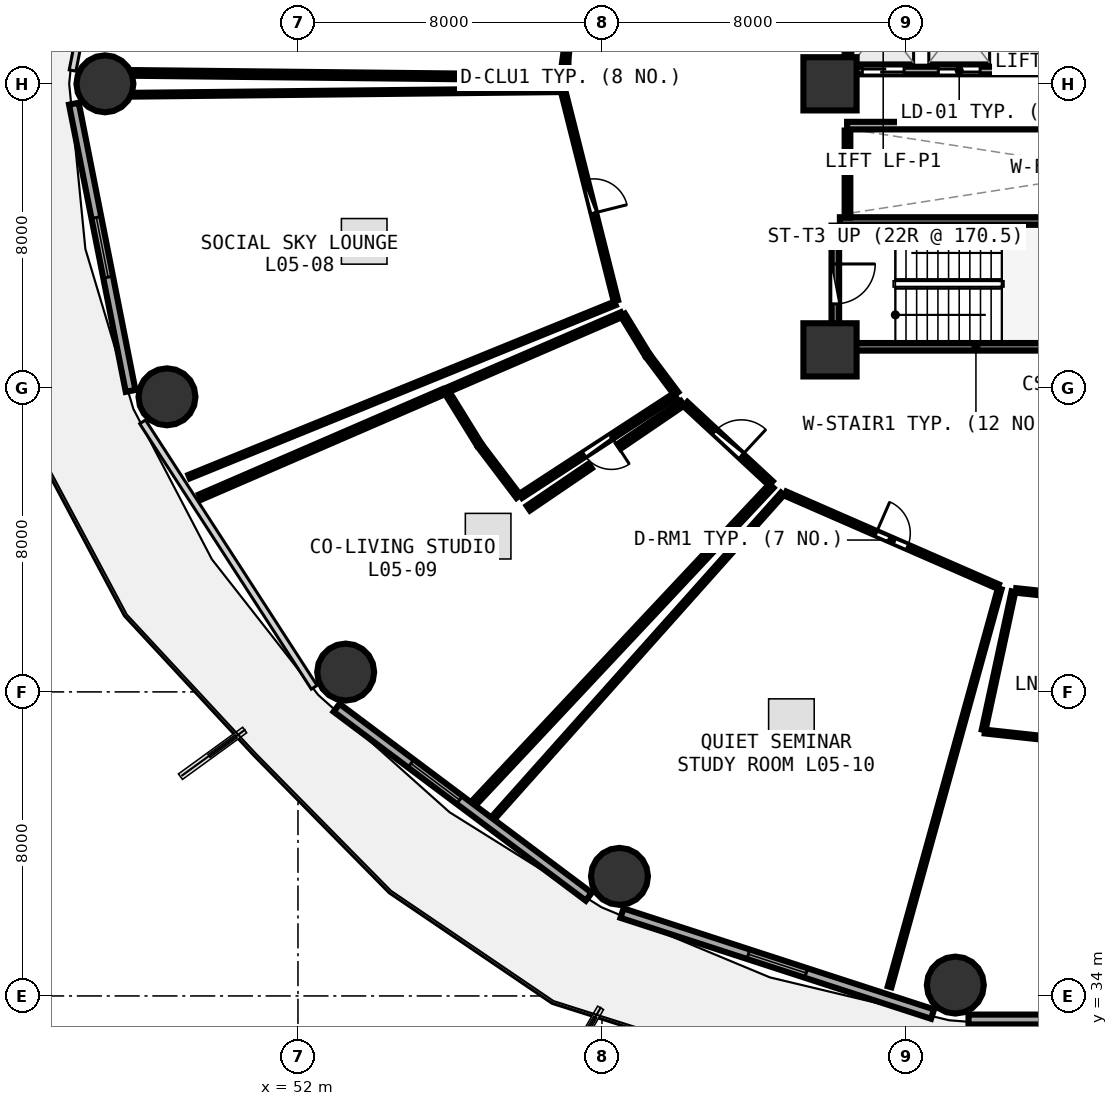
"""IFC4 building model, lengths in metres.
Left out: names, types, materials, properties, quantities, classifications, styles, units other than length and angle.
Written with IfcOpenShell. Run it as: python <this file> out.ifc"""

import sys

from ifc_helpers import new_model, si_unit, direction, frame, frame_2d, origin, origin_2d, place, context, subcontext, project, spatial, rectangle, circle, extrude, element, fill, save


model = new_model("IFC4")
c1 = context("Model", 3, precision=1e-05, world=origin(), true_north=direction((0.0, 1.0)))
c2 = subcontext(c1, "Body", "Model", "MODEL_VIEW")
j1 = project(units=[si_unit("LENGTHUNIT", "METRE"), si_unit("PLANEANGLEUNIT", "RADIAN")], contexts=[c1])
p1 = place(None, origin())
s1 = spatial("IfcSite", under=j1, at=p1, CompositionType="ELEMENT")
p2 = place(p1, origin())
s2 = spatial("IfcBuilding", under=s1, at=p2, CompositionType="ELEMENT")
p3 = place(p2, frame((0.0, 0.0, 22.5)))
s3 = spatial("IfcBuildingStorey", under=s2, at=p3, CompositionType="ELEMENT", Elevation=22.5)
for number, where, z_axis, x_axis in (
    (1, (66.0, 51.0, 0.0), (0.0, 0.0, 1.0), (1.0, 0.0, 0.0)),
    (2, (66.0, 58.0, 0.0), (0.0, 0.0, 1.0), (1.0, 0.0, 0.0)),
):
    element("IfcColumn", number, at=place(p3, frame(where, z_axis=z_axis, x_axis=x_axis)), inside=s3, PredefinedType="PILASTER", context=c2, shape_type="SweptSolid", body=[
        extrude(rectangle(XDim=1.4, YDim=1.4, at=origin_2d()), origin(), (0.0, 0.0, 1.0), 3.75),
    ])
for number, where, z_axis, x_axis in (
    (3, (46.92, 58.0, 0.0), (0.0, 0.0, 1.0), (1.0, 0.0, 0.0)),
    (4, (48.553, 49.764, 0.0), (0.0, 0.0, 1.0), (1.0, 0.0, 0.0)),
    (5, (53.256, 42.522, 0.0), (0.0, 0.0, 1.0), (1.0, 0.0, 0.0)),
    (6, (60.46, 37.146, 0.0), (0.0, 0.0, 1.0), (1.0, 0.0, 0.0)),
    (7, (69.298, 34.286, 0.0), (0.0, 0.0, 1.0), (1.0, 0.0, 0.0)),
):
    element("IfcColumn", number, at=place(p3, frame(where, z_axis=z_axis, x_axis=x_axis)), inside=s3, PredefinedType="COLUMN", context=c2, shape_type="SweptSolid", body=[
        extrude(circle(Radius=0.75, at=origin_2d()), origin(), (0.0, 0.0, 1.0), 3.75),
    ])
p4 = place(p3, frame((46.104, 57.477, 0.0), z_axis=(0.0, 0.0, 1.0), x_axis=(0.193726159581, -0.98105564322, 0.0)))
e8 = element("IfcWall", 8, at=p4, inside=s3, PredefinedType="SOLIDWALL", context=c2, shape_type="SweptSolid", body=[
    extrude(rectangle(XDim=7.703, YDim=0.26, at=frame_2d((3.851, 0.0))), origin(), (0.0, 0.0, 1.0), 3.475),
])
p5 = place(p4, frame((3.051, 0.0, 0.85)))
e9 = element("IfcOpeningElement", 9, at=p5, cuts=e8, PredefinedType="OPENING", context=c2, shape_type="SweptSolid", body=[
    extrude(rectangle(XDim=1.6, YDim=1.45, at=frame_2d((0.8, 0.725))), frame((0.0, 0.14, 0.0), z_axis=(0.0, -1.0, 0.0), x_axis=(1.0, 0.0, 0.0)), (0.0, 0.0, 1.0), 0.28),
])
p6 = place(p3, frame((53.016, 41.582, 0.0), z_axis=(0.0, 0.0, 1.0), x_axis=(0.80030733173, -0.599590005569, 0.0)))
e10 = element("IfcWall", 10, at=p6, inside=s3, PredefinedType="SOLIDWALL", context=c2, shape_type="SweptSolid", body=[
    extrude(rectangle(XDim=8.291, YDim=0.26, at=frame_2d((4.145, 0.0))), origin(), (0.0, 0.0, 1.0), 3.475),
])
p7 = place(p6, frame((2.445, 0.0, 0.85)))
e11 = element("IfcOpeningElement", 11, at=p7, cuts=e10, PredefinedType="OPENING", context=c2, shape_type="SweptSolid", body=[
    extrude(rectangle(XDim=1.6, YDim=1.45, at=frame_2d((0.8, 0.725))), frame((0.0, 0.14, 0.0), z_axis=(0.0, -1.0, 0.0), x_axis=(1.0, 0.0, 0.0)), (0.0, 0.0, 1.0), 0.28),
])
p8 = place(p3, frame((60.526, 36.178, 0.0), z_axis=(0.0, 0.0, 1.0), x_axis=(0.951039914291, -0.309068085421, 0.0)))
e12 = element("IfcWall", 12, at=p8, inside=s3, PredefinedType="SOLIDWALL", context=c2, shape_type="SweptSolid", body=[
    extrude(rectangle(XDim=8.594, YDim=0.26, at=frame_2d((4.297, 0.0))), origin(), (0.0, 0.0, 1.0), 3.475),
])
p9 = place(p8, frame((3.497, 0.0, 0.85)))
e13 = element("IfcOpeningElement", 13, at=p9, cuts=e12, PredefinedType="OPENING", context=c2, shape_type="SweptSolid", body=[
    extrude(rectangle(XDim=1.6, YDim=1.45, at=frame_2d((0.8, 0.725))), frame((0.0, 0.14, 0.0), z_axis=(0.0, -1.0, 0.0), x_axis=(1.0, 0.0, 0.0)), (0.0, 0.0, 1.0), 0.28),
])
p10 = place(p3, frame((69.644, 33.38, 0.0), z_axis=(0.0, 0.0, 1.0), x_axis=(1.0, 0.0, 0.0)))
e14 = element("IfcWall", 14, at=p10, inside=s3, PredefinedType="SOLIDWALL", context=c2, shape_type="SweptSolid", body=[
    extrude(rectangle(XDim=8.712, YDim=0.26, at=frame_2d((4.356, 0.0))), origin(), (0.0, 0.0, 1.0), 3.475),
])
p11 = place(p10, frame((4.456, 0.0, 0.85)))
e15 = element("IfcOpeningElement", 15, at=p11, cuts=e14, PredefinedType="OPENING", context=c2, shape_type="SweptSolid", body=[
    extrude(rectangle(XDim=1.6, YDim=1.45, at=frame_2d((0.8, 0.725))), frame((0.0, 0.14, 0.0), z_axis=(0.0, -1.0, 0.0), x_axis=(1.0, 0.0, 0.0)), (0.0, 0.0, 1.0), 0.28),
])
for number, where, z_axis, x_axis in (
    (16, (66.26, 51.08, 0.0), (0.0, 0.0, 1.0), (1.0, 0.0, 0.0)),
    (17, (73.42, 54.39, 0.0), (0.0, 0.0, 1.0), (-1.0, 0.0, 0.0)),
):
    element("IfcWall", number, at=place(p3, frame(where, z_axis=z_axis, x_axis=x_axis)), inside=s3, PredefinedType="SHEAR", context=c2, shape_type="SweptSolid", body=[
        extrude(rectangle(XDim=7.16, YDim=0.2, at=frame_2d((3.58, 0.0))), origin(), (0.0, 0.0, 1.0), 3.49),
    ])
p12 = place(p3, frame((66.14, 54.27, 0.0), z_axis=(0.0, 0.0, 1.0), x_axis=(0.0, -1.0, 0.0)))
e18 = element("IfcWall", 18, at=p12, inside=s3, PredefinedType="SHEAR", context=c2, shape_type="SweptSolid", body=[
    extrude(rectangle(XDim=3.07, YDim=0.2, at=frame_2d((1.535, 0.0))), origin(), (0.0, 0.0, 1.0), 3.49),
])
p13 = place(p12, frame((1.01, 0.0, 0.0)))
e19 = element("IfcOpeningElement", 19, at=p13, cuts=e18, PredefinedType="OPENING", context=c2, shape_type="SweptSolid", body=[
    extrude(rectangle(XDim=1.05, YDim=2.1, at=frame_2d((0.525, 1.05))), frame((0.0, 0.11, 0.0), z_axis=(0.0, -1.0, 0.0), x_axis=(1.0, 0.0, 0.0)), (0.0, 0.0, 1.0), 0.22),
])
p14 = place(p3, frame((66.45, 58.35, 0.0), z_axis=(0.0, 0.0, 1.0), x_axis=(1.0, 0.0, 0.0)))
e20 = element("IfcWall", 20, at=p14, inside=s3, PredefinedType="SOLIDWALL", context=c2, shape_type="SweptSolid", body=[
    extrude(rectangle(XDim=6.0, YDim=0.2, at=frame_2d((3.0, 0.0))), origin(), (0.0, 0.0, 1.0), 3.48),
])
p15 = place(p14, frame((0.4, 0.0, 0.0)))
e21 = element("IfcOpeningElement", 21, at=p15, cuts=e20, PredefinedType="OPENING", context=c2, shape_type="SweptSolid", body=[
    extrude(rectangle(XDim=1.1, YDim=2.1, at=frame_2d((0.55, 1.05))), frame((0.0, 0.11, 0.0), z_axis=(0.0, -1.0, 0.0), x_axis=(1.0, 0.0, 0.0)), (0.0, 0.0, 1.0), 0.22),
])
p16 = place(p14, frame((2.4, 0.0, 0.0)))
e22 = element("IfcOpeningElement", 22, at=p16, cuts=e20, PredefinedType="OPENING", context=c2, shape_type="SweptSolid", body=[
    extrude(rectangle(XDim=1.1, YDim=2.1, at=frame_2d((0.55, 1.05))), frame((0.0, 0.11, 0.0), z_axis=(0.0, -1.0, 0.0), x_axis=(1.0, 0.0, 0.0)), (0.0, 0.0, 1.0), 0.22),
])
p17 = place(p14, frame((4.4, 0.0, 0.0)))
e23 = element("IfcOpeningElement", 23, at=p17, cuts=e20, PredefinedType="OPENING", context=c2, shape_type="SweptSolid", body=[
    extrude(rectangle(XDim=1.1, YDim=2.1, at=frame_2d((0.55, 1.05))), frame((0.0, 0.11, 0.0), z_axis=(0.0, -1.0, 0.0), x_axis=(1.0, 0.0, 0.0)), (0.0, 0.0, 1.0), 0.22),
])
p18 = place(p3, frame((66.46, 58.48, 0.0), z_axis=(0.0, 0.0, 1.0), x_axis=(0.0, 1.0, 0.0)))
e24 = element("IfcWall", 24, at=p18, inside=s3, PredefinedType="PARTITIONING", context=c2, shape_type="SweptSolid", body=[
    extrude(rectangle(XDim=2.46, YDim=0.15, at=frame_2d((1.23, 0.0))), origin(), (0.0, 0.0, 1.0), 3.48),
])
p19 = place(p3, frame((66.45, 56.9, 0.0), z_axis=(0.0, 0.0, 1.0), x_axis=(1.0, 0.0, 0.0)))
e25 = element("IfcWall", 25, at=p19, inside=s3, PredefinedType="SOLIDWALL", context=c2, shape_type="SweptSolid", body=[
    extrude(rectangle(XDim=14.4, YDim=0.2, at=frame_2d((7.2, 0.0))), origin(), (0.0, 0.0, 1.0), 3.48),
])
p20 = place(p3, frame((66.46, 54.48, 0.0), z_axis=(0.0, 0.0, 1.0), x_axis=(0.0, 1.0, 0.0)))
e26 = element("IfcWall", 26, at=p20, inside=s3, PredefinedType="PARTITIONING", context=c2, shape_type="SweptSolid", body=[
    extrude(rectangle(XDim=2.29, YDim=0.15, at=frame_2d((1.145, 0.0))), origin(), (0.0, 0.0, 1.0), 3.48),
])
p21 = place(p3, frame((59.375, 61.115, 0.0), z_axis=(0.0, 0.0, 1.0), x_axis=(-0.135838186105, -0.990731036758, 0.0)))
e27 = element("IfcWall", 27, at=p21, inside=s3, PredefinedType="PARTITIONING", context=c2, shape_type="SweptSolid", body=[
    extrude(rectangle(XDim=2.915, YDim=0.15, at=frame_2d((1.458, 0.0))), origin(), (0.0, 0.0, 1.0), 3.48),
])
p22 = place(p21, frame((0.983, 0.0, 0.0)))
e28 = element("IfcOpeningElement", 28, at=p22, cuts=e27, PredefinedType="OPENING", context=c2, shape_type="SweptSolid", body=[
    extrude(rectangle(XDim=0.95, YDim=2.08, at=frame_2d((0.475, 1.04))), frame((0.0, 0.085, 0.0), z_axis=(0.0, -1.0, 0.0), x_axis=(1.0, 0.0, 0.0)), (0.0, 0.0, 1.0), 0.17),
])
p23 = place(p3, frame((58.986, 57.775, 0.0), z_axis=(0.0, 0.0, 1.0), x_axis=(0.244192294026, -0.969726829338, 0.0)))
e29 = element("IfcWall", 29, at=p23, inside=s3, PredefinedType="PARTITIONING", context=c2, shape_type="SweptSolid", body=[
    extrude(rectangle(XDim=5.651, YDim=0.12, at=frame_2d((2.825, 0.0))), origin(), (0.0, 0.0, 1.0), 3.48),
])
p24 = place(p23, frame((2.375, 0.0, 0.0)))
e30 = element("IfcOpeningElement", 30, at=p24, cuts=e29, PredefinedType="OPENING", context=c2, shape_type="SweptSolid", body=[
    extrude(rectangle(XDim=0.9, YDim=2.08, at=frame_2d((0.45, 1.04))), frame((0.0, 0.07, 0.0), z_axis=(0.0, -1.0, 0.0), x_axis=(1.0, 0.0, 0.0)), (0.0, 0.0, 1.0), 0.14),
])
p25 = place(p3, frame((61.917, 49.8, 0.0), z_axis=(0.0, 0.0, 1.0), x_axis=(-0.837796261941, -0.545982988267, 0.0)))
e31 = element("IfcWall", 31, at=p25, inside=s3, PredefinedType="PLUMBINGWALL", context=c2, shape_type="SweptSolid", body=[
    extrude(rectangle(XDim=4.838, YDim=0.13, at=frame_2d((2.419, 0.0))), origin(), (0.0, 0.0, 1.0), 3.235),
])
p26 = place(p25, frame((1.989, 0.0, 0.0)))
e32 = element("IfcOpeningElement", 32, at=p26, cuts=e31, PredefinedType="OPENING", context=c2, shape_type="SweptSolid", body=[
    extrude(rectangle(XDim=0.86, YDim=2.05, at=frame_2d((0.43, 1.025))), frame((0.0, 0.075, 0.0), z_axis=(0.0, -1.0, 0.0), x_axis=(1.0, 0.0, 0.0)), (0.0, 0.0, 1.0), 0.15),
])
p27 = place(p3, frame((62.194, 49.575, 0.0), z_axis=(0.0, 0.0, 1.0), x_axis=(0.7329267348, -0.680307578538, 0.0)))
e33 = element("IfcWall", 33, at=p27, inside=s3, PredefinedType="PARTITIONING", context=c2, shape_type="SweptSolid", body=[
    extrude(rectangle(XDim=3.067, YDim=0.15, at=frame_2d((1.533, 0.0))), origin(), (0.0, 0.0, 1.0), 2.875),
])
p28 = place(p27, frame((1.059, 0.0, 0.0)))
e34 = element("IfcOpeningElement", 34, at=p28, cuts=e33, PredefinedType="OPENING", context=c2, shape_type="SweptSolid", body=[
    extrude(rectangle(XDim=0.95, YDim=2.08, at=frame_2d((0.475, 1.04))), frame((0.0, 0.085, 0.0), z_axis=(0.0, -1.0, 0.0), x_axis=(1.0, 0.0, 0.0)), (0.0, 0.0, 1.0), 0.17),
])
p29 = place(p3, frame((64.828, 47.217, 0.0), z_axis=(0.0, 0.0, 1.0), x_axis=(0.916419655578, -0.400218708797, 0.0)))
e35 = element("IfcWall", 35, at=p29, inside=s3, PredefinedType="PARTITIONING", context=c2, shape_type="SweptSolid", body=[
    extrude(rectangle(XDim=6.104, YDim=0.12, at=frame_2d((3.052, 0.0))), origin(), (0.0, 0.0, 1.0), 2.875),
])
p30 = place(p29, frame((2.602, 0.0, 0.0)))
e36 = element("IfcOpeningElement", 36, at=p30, cuts=e35, PredefinedType="OPENING", context=c2, shape_type="SweptSolid", body=[
    extrude(rectangle(XDim=0.9, YDim=2.08, at=frame_2d((0.45, 1.04))), frame((0.0, 0.07, 0.0), z_axis=(0.0, -1.0, 0.0), x_axis=(1.0, 0.0, 0.0)), (0.0, 0.0, 1.0), 0.14),
])
p31 = place(p3, frame((70.895, 44.67, 0.0), z_axis=(0.0, 0.0, 1.0), x_axis=(0.994302004983, -0.106599825921, 0.0)))
e37 = element("IfcWall", 37, at=p31, inside=s3, PredefinedType="PARTITIONING", context=c2, shape_type="SweptSolid", body=[
    extrude(rectangle(XDim=2.714, YDim=0.12, at=frame_2d((1.357, 0.0))), origin(), (0.0, 0.0, 1.0), 3.235),
])
p32 = place(p31, frame((0.907, 0.0, 0.0)))
e38 = element("IfcOpeningElement", 38, at=p32, cuts=e37, PredefinedType="OPENING", context=c2, shape_type="SweptSolid", body=[
    extrude(rectangle(XDim=0.9, YDim=2.08, at=frame_2d((0.45, 1.04))), frame((0.0, 0.07, 0.0), z_axis=(0.0, -1.0, 0.0), x_axis=(1.0, 0.0, 0.0)), (0.0, 0.0, 1.0), 0.14),
])
p33 = place(p3, frame((58.931, 58.167, 0.0), z_axis=(0.0, 0.0, 1.0), x_axis=(-0.999943877154, 0.010594458135, 0.0)))
e39 = element("IfcWall", 39, at=p33, inside=s3, PredefinedType="PARTITIONING", context=c2, shape_type="SweptSolid", body=[
    extrude(rectangle(XDim=11.292, YDim=0.15, at=frame_2d((5.646, 0.0))), origin(), (0.0, 0.0, 1.0), 2.875),
])
p34 = place(p3, frame((60.343, 52.222, 0.0), z_axis=(0.0, 0.0, 1.0), x_axis=(-0.926333713065, -0.376703931542, 0.0)))
e40 = element("IfcWall", 40, at=p34, inside=s3, PredefinedType="PARTITIONING", context=c2, shape_type="SweptSolid", body=[
    extrude(rectangle(XDim=12.099, YDim=0.1, at=frame_2d((6.05, 0.0))), origin(), (0.0, 0.0, 1.0), 2.875),
])
p35 = place(p3, frame((47.64, 57.713, 0.0), z_axis=(0.0, 0.0, 1.0), x_axis=(0.999943877154, 0.010594458135, 0.0)))
e41 = element("IfcWall", 41, at=p35, inside=s3, PredefinedType="PARTITIONING", context=c2, shape_type="SweptSolid", body=[
    extrude(rectangle(XDim=11.292, YDim=0.1, at=frame_2d((5.646, 0.0))), origin(), (0.0, 0.0, 1.0), 2.875),
])
p36 = place(p3, frame((60.549, 51.92, 0.0), z_axis=(0.0, 0.0, 1.0), x_axis=(0.52146609248, -0.853272004928, 0.0)))
e42 = element("IfcWall", 42, at=p36, inside=s3, PredefinedType="PLUMBINGWALL", context=c2, shape_type="SweptSolid", body=[
    extrude(rectangle(XDim=1.228, YDim=0.13, at=frame_2d((0.614, 0.0))), origin(), (0.0, 0.0, 1.0), 3.48),
])
p37 = place(p3, frame((61.212, 50.839, 0.0), z_axis=(0.0, 0.0, 1.0), x_axis=(0.600347056143, -0.79973959023, 0.0)))
e43 = element("IfcWall", 43, at=p37, inside=s3, PredefinedType="PLUMBINGWALL", context=c2, shape_type="SweptSolid", body=[
    extrude(rectangle(XDim=1.238, YDim=0.13, at=frame_2d((0.619, 0.0))), origin(), (0.0, 0.0, 1.0), 2.875),
])
p38 = place(p3, frame((57.801, 47.142, 0.0), z_axis=(0.0, 0.0, 1.0), x_axis=(-0.60376191721, 0.797164692725, 0.0)))
e44 = element("IfcWall", 44, at=p38, inside=s3, PredefinedType="PLUMBINGWALL", context=c2, shape_type="SweptSolid", body=[
    extrude(rectangle(XDim=1.669, YDim=0.13, at=frame_2d((0.834, 0.0))), origin(), (0.0, 0.0, 1.0), 3.175),
])
p39 = place(p3, frame((56.771, 48.505, 0.0), z_axis=(0.0, 0.0, 1.0), x_axis=(-0.525540089642, 0.850768837099, 0.0)))
e45 = element("IfcWall", 45, at=p39, inside=s3, PredefinedType="PLUMBINGWALL", context=c2, shape_type="SweptSolid", body=[
    extrude(rectangle(XDim=1.651, YDim=0.13, at=frame_2d((0.826, 0.0))), origin(), (0.0, 0.0, 1.0), 3.175),
])
p40 = place(p3, frame((55.91, 49.935, 0.0), z_axis=(0.0, 0.0, 1.0), x_axis=(0.917797204715, 0.397049481826, 0.0)))
e46 = element("IfcWall", 46, at=p40, inside=s3, PredefinedType="PLUMBINGWALL", context=c2, shape_type="SweptSolid", body=[
    extrude(rectangle(XDim=5.023, YDim=0.13, at=frame_2d((2.511, 0.0))), origin(), (0.0, 0.0, 1.0), 2.875),
])
p41 = place(p3, frame((64.458, 47.419, 0.0), z_axis=(0.0, 0.0, 1.0), x_axis=(-0.684261294523, -0.729236916796, 0.0)))
e47 = element("IfcWall", 47, at=p41, inside=s3, PredefinedType="PARTITIONING", context=c2, shape_type="SweptSolid", body=[
    extrude(rectangle(XDim=11.438, YDim=0.15, at=frame_2d((5.719, 0.0))), origin(), (0.0, 0.0, 1.0), 2.875),
])
p42 = place(p3, frame((49.426, 47.126, 0.0), z_axis=(0.0, 0.0, 1.0), x_axis=(0.917736225937, 0.397190407239, 0.0)))
e48 = element("IfcWall", 48, at=p42, inside=s3, PredefinedType="PARTITIONING", context=c2, shape_type="SweptSolid", body=[
    extrude(rectangle(XDim=6.967, YDim=0.15, at=frame_2d((3.483, 0.0))), origin(), (0.0, 0.0, 1.0), 2.875),
])
p43 = place(p3, frame((58.061, 46.834, 0.0), z_axis=(0.0, 0.0, 1.0), x_axis=(0.826811291248, 0.562479411769, 0.0)))
e49 = element("IfcWall", 49, at=p43, inside=s3, PredefinedType="PARTITIONING", context=c2, shape_type="SweptSolid", body=[
    extrude(rectangle(XDim=1.971, YDim=0.15, at=frame_2d((0.985, 0.0))), origin(), (0.0, 0.0, 1.0), 3.48),
])
p44 = place(p3, frame((60.451, 48.461, 0.0), z_axis=(0.0, 0.0, 1.0), x_axis=(0.826867883695, 0.562396215237, 0.0)))
e50 = element("IfcWall", 50, at=p44, inside=s3, PredefinedType="PARTITIONING", context=c2, shape_type="SweptSolid", body=[
    extrude(rectangle(XDim=2.014, YDim=0.15, at=frame_2d((1.007, 0.0))), origin(), (0.0, 0.0, 1.0), 3.235),
])
p45 = place(p3, frame((70.466, 44.711, 0.0), z_axis=(0.0, 0.0, 1.0), x_axis=(-0.26671307518, -0.963775977875, 0.0)))
e51 = element("IfcWall", 51, at=p45, inside=s3, PredefinedType="PARTITIONING", context=c2, shape_type="SweptSolid", body=[
    extrude(rectangle(XDim=10.865, YDim=0.1, at=frame_2d((5.432, 0.0))), origin(), (0.0, 0.0, 1.0), 2.875),
])
p46 = place(p3, frame((57.156, 38.706, 0.0), z_axis=(0.0, 0.0, 1.0), x_axis=(0.66580890104, 0.746122313897, 0.0)))
e52 = element("IfcWall", 52, at=p46, inside=s3, PredefinedType="PARTITIONING", context=c2, shape_type="SweptSolid", body=[
    extrude(rectangle(XDim=11.399, YDim=0.1, at=frame_2d((5.7, 0.0))), origin(), (0.0, 0.0, 1.0), 2.875),
])
p47 = place(p3, frame((73.525, 40.579, 0.0), z_axis=(0.0, 0.0, 1.0), x_axis=(-0.994070147468, 0.108740709544, 0.0)))
e53 = element("IfcWall", 53, at=p47, inside=s3, PredefinedType="PARTITIONING", context=c2, shape_type="SweptSolid", body=[
    extrude(rectangle(XDim=3.471, YDim=0.1, at=frame_2d((1.735, 0.0))), origin(), (0.0, 0.0, 1.0), 3.175),
])
p48 = place(p3, frame((70.043, 41.0, 0.0), z_axis=(0.0, 0.0, 1.0), x_axis=(0.210519412271, 0.977589677246, 0.0)))
e54 = element("IfcWall", 54, at=p48, inside=s3, PredefinedType="PARTITIONING", context=c2, shape_type="SweptSolid", body=[
    extrude(rectangle(XDim=3.72, YDim=0.1, at=frame_2d((1.86, 0.0))), origin(), (0.0, 0.0, 1.0), 3.175),
])
p49 = place(p5, origin())
e55 = element("IfcWindow", 55, at=p49, inside=s3, PartitioningType="SINGLE_PANEL", PredefinedType="WINDOW", context=c2, shape_type="SweptSolid", body=[
    extrude(rectangle(XDim=1.6, YDim=1.45, at=frame_2d((0.8, 0.725))), frame((0.0, 0.03, 0.0), z_axis=(0.0, -1.0, 0.0), x_axis=(1.0, 0.0, 0.0)), (0.0, 0.0, 1.0), 0.06),
])
fill(e9, e55)
p50 = place(p7, origin())
e56 = element("IfcWindow", 56, at=p50, inside=s3, PartitioningType="SINGLE_PANEL", PredefinedType="WINDOW", context=c2, shape_type="SweptSolid", body=[
    extrude(rectangle(XDim=1.6, YDim=1.45, at=frame_2d((0.8, 0.725))), frame((0.0, 0.03, 0.0), z_axis=(0.0, -1.0, 0.0), x_axis=(1.0, 0.0, 0.0)), (0.0, 0.0, 1.0), 0.06),
])
fill(e11, e56)
p51 = place(p9, origin())
e57 = element("IfcWindow", 57, at=p51, inside=s3, PartitioningType="SINGLE_PANEL", PredefinedType="WINDOW", context=c2, shape_type="SweptSolid", body=[
    extrude(rectangle(XDim=1.6, YDim=1.45, at=frame_2d((0.8, 0.725))), frame((0.0, 0.03, 0.0), z_axis=(0.0, -1.0, 0.0), x_axis=(1.0, 0.0, 0.0)), (0.0, 0.0, 1.0), 0.06),
])
fill(e13, e57)
p52 = place(p13, origin())
e58 = element("IfcDoor", 58, at=p52, inside=s3, OperationType="SINGLE_SWING_LEFT", PredefinedType="DOOR", context=c2, shape_type="SweptSolid", body=[
    extrude(rectangle(XDim=1.05, YDim=2.1, at=frame_2d((0.525, 1.05))), frame((0.0, 0.025, 0.0), z_axis=(0.0, -1.0, 0.0), x_axis=(1.0, 0.0, 0.0)), (0.0, 0.0, 1.0), 0.05),
])
fill(e19, e58)
p53 = place(p15, origin())
e59 = element("IfcDoor", 59, at=p53, inside=s3, OperationType="DOUBLE_DOOR_SLIDING", PredefinedType="DOOR", context=c2, shape_type="SweptSolid", body=[
    extrude(rectangle(XDim=1.1, YDim=2.1, at=frame_2d((0.55, 1.05))), frame((0.0, 0.025, 0.0), z_axis=(0.0, -1.0, 0.0), x_axis=(1.0, 0.0, 0.0)), (0.0, 0.0, 1.0), 0.05),
])
fill(e21, e59)
p54 = place(p16, origin())
e60 = element("IfcDoor", 60, at=p54, inside=s3, OperationType="DOUBLE_DOOR_SLIDING", PredefinedType="DOOR", context=c2, shape_type="SweptSolid", body=[
    extrude(rectangle(XDim=1.1, YDim=2.1, at=frame_2d((0.55, 1.05))), frame((0.0, 0.025, 0.0), z_axis=(0.0, -1.0, 0.0), x_axis=(1.0, 0.0, 0.0)), (0.0, 0.0, 1.0), 0.05),
])
fill(e22, e60)
p55 = place(p17, origin())
e61 = element("IfcDoor", 61, at=p55, inside=s3, OperationType="DOUBLE_DOOR_SLIDING", PredefinedType="DOOR", context=c2, shape_type="SweptSolid", body=[
    extrude(rectangle(XDim=1.1, YDim=2.1, at=frame_2d((0.55, 1.05))), frame((0.0, 0.025, 0.0), z_axis=(0.0, -1.0, 0.0), x_axis=(1.0, 0.0, 0.0)), (0.0, 0.0, 1.0), 0.05),
])
fill(e23, e61)
p56 = place(p24, origin())
e62 = element("IfcDoor", 62, at=p56, inside=s3, OperationType="SINGLE_SWING_RIGHT", PredefinedType="DOOR", context=c2, shape_type="SweptSolid", body=[
    extrude(rectangle(XDim=0.9, YDim=2.08, at=frame_2d((0.45, 1.04))), frame((0.0, 0.025, 0.0), z_axis=(0.0, -1.0, 0.0), x_axis=(1.0, 0.0, 0.0)), (0.0, 0.0, 1.0), 0.05),
])
fill(e30, e62)
p57 = place(p26, origin())
e63 = element("IfcDoor", 63, at=p57, inside=s3, OperationType="SINGLE_SWING_LEFT", PredefinedType="DOOR", context=c2, shape_type="SweptSolid", body=[
    extrude(rectangle(XDim=0.86, YDim=2.05, at=frame_2d((0.43, 1.025))), frame((0.0, 0.025, 0.0), z_axis=(0.0, -1.0, 0.0), x_axis=(1.0, 0.0, 0.0)), (0.0, 0.0, 1.0), 0.05),
])
fill(e32, e63)
p58 = place(p28, origin())
e64 = element("IfcDoor", 64, at=p58, inside=s3, OperationType="SINGLE_SWING_RIGHT", PredefinedType="DOOR", context=c2, shape_type="SweptSolid", body=[
    extrude(rectangle(XDim=0.95, YDim=2.08, at=frame_2d((0.475, 1.04))), frame((0.0, 0.025, 0.0), z_axis=(0.0, -1.0, 0.0), x_axis=(1.0, 0.0, 0.0)), (0.0, 0.0, 1.0), 0.05),
])
fill(e34, e64)
p59 = place(p30, origin())
e65 = element("IfcDoor", 65, at=p59, inside=s3, OperationType="SINGLE_SWING_LEFT", PredefinedType="DOOR", context=c2, shape_type="SweptSolid", body=[
    extrude(rectangle(XDim=0.9, YDim=2.08, at=frame_2d((0.45, 1.04))), frame((0.0, 0.025, 0.0), z_axis=(0.0, -1.0, 0.0), x_axis=(1.0, 0.0, 0.0)), (0.0, 0.0, 1.0), 0.05),
])
fill(e36, e65)
save(model, sys.argv[1])
